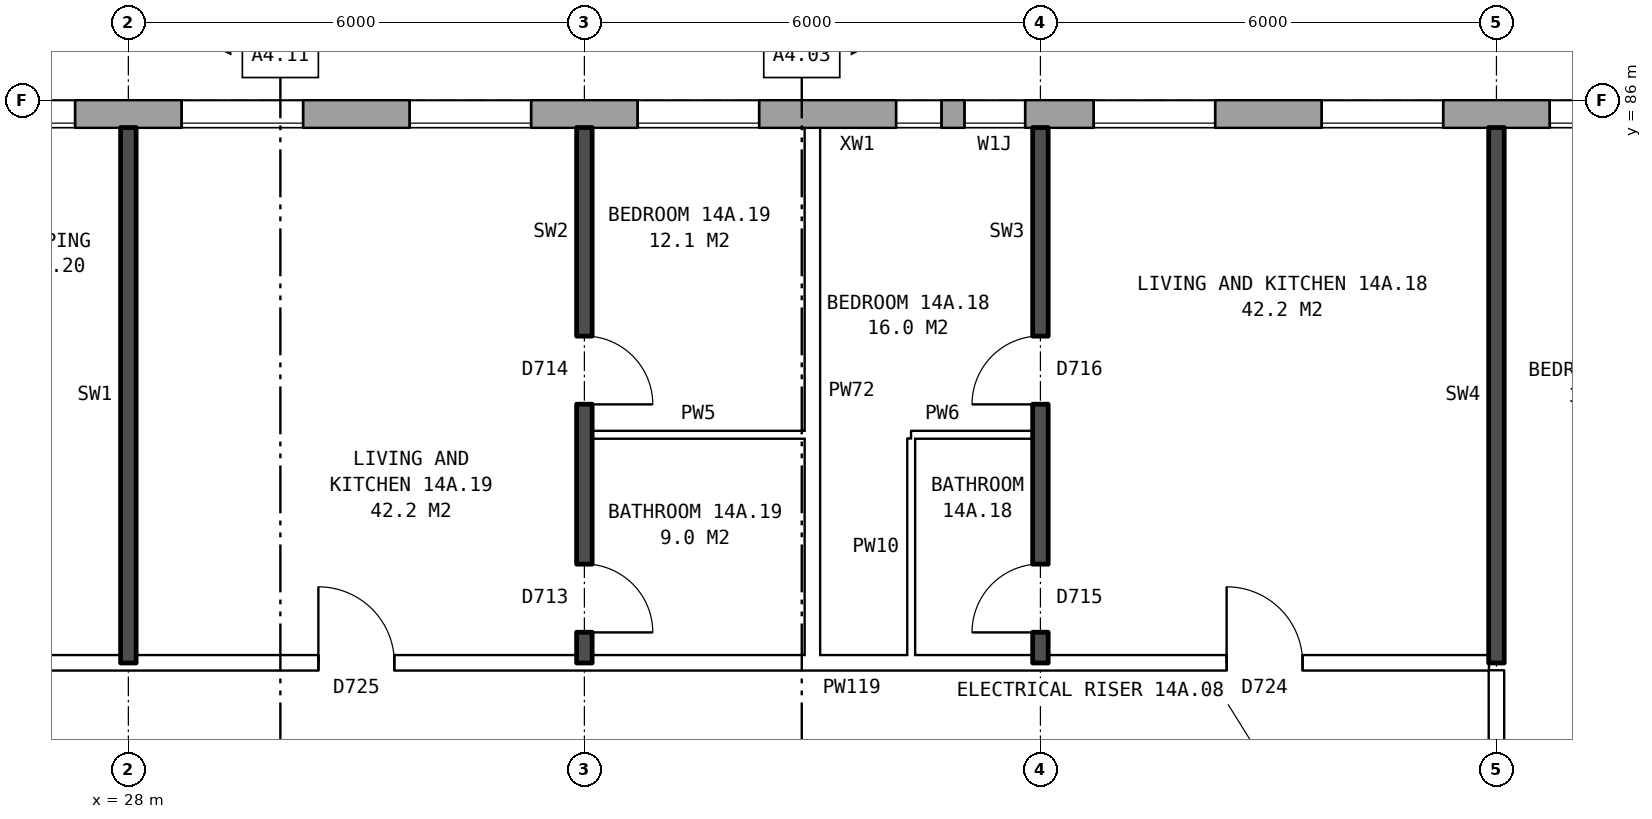
"""IFC4 building model, lengths in metres.
Left out: names, types, materials, properties, quantities, classifications, styles, units other than length and angle.
Written with IfcOpenShell. Run it as: python <this file> out.ifc"""

import sys

from ifc_helpers import new_model, si_unit, direction, frame, frame_2d, origin, place, context, subcontext, project, spatial, rectangle, extrude, element, fill, save


model = new_model("IFC4")
c1 = context("Model", 3, precision=1e-05, world=origin(), true_north=direction((0.0, 1.0)))
c2 = subcontext(c1, "Body", "Model", "MODEL_VIEW")
j1 = project(units=[si_unit("LENGTHUNIT", "METRE"), si_unit("PLANEANGLEUNIT", "RADIAN")], contexts=[c1])
p1 = place(None, origin())
s1 = spatial("IfcSite", under=j1, at=p1, CompositionType="ELEMENT")
p2 = place(p1, origin())
s2 = spatial("IfcBuilding", under=s1, at=p2, CompositionType="ELEMENT")
p3 = place(p2, frame((0.0, 0.0, 53.6)))
s3 = spatial("IfcBuildingStorey", under=s2, at=p3, CompositionType="ELEMENT", Elevation=53.6)
p4 = place(p3, frame((72.925, 85.82, 0.0), z_axis=(0.0, 0.0, 1.0), x_axis=(-1.0, 0.0, 0.0)))
e1 = element("IfcWall", 1, at=p4, inside=s3, PredefinedType="STANDARD", context=c2, shape_type="SweptSolid", body=[
    extrude(rectangle(XDim=48.351, YDim=0.36, at=frame_2d((24.175, 0.0))), origin(), (0.0, 0.0, 1.0), 2.85),
])
p5 = place(p4, frame((0.625, 0.0, 0.8)))
e2 = element("IfcOpeningElement", 2, at=p5, cuts=e1, PredefinedType="OPENING", context=c2, shape_type="SweptSolid", body=[
    extrude(rectangle(XDim=1.6, YDim=1.8, at=frame_2d((0.8, 0.9))), frame((0.0, 0.19, 0.0), z_axis=(0.0, -1.0, 0.0), x_axis=(1.0, 0.0, 0.0)), (0.0, 0.0, 1.0), 0.38),
])
p6 = place(p4, frame((3.625, 0.0, 0.8)))
e3 = element("IfcOpeningElement", 3, at=p6, cuts=e1, PredefinedType="OPENING", context=c2, shape_type="SweptSolid", body=[
    extrude(rectangle(XDim=1.6, YDim=1.8, at=frame_2d((0.8, 0.9))), frame((0.0, 0.19, 0.0), z_axis=(0.0, -1.0, 0.0), x_axis=(1.0, 0.0, 0.0)), (0.0, 0.0, 1.0), 0.38),
])
p7 = place(p4, frame((6.625, 0.0, 0.8)))
e4 = element("IfcOpeningElement", 4, at=p7, cuts=e1, PredefinedType="OPENING", context=c2, shape_type="SweptSolid", body=[
    extrude(rectangle(XDim=1.6, YDim=1.8, at=frame_2d((0.8, 0.9))), frame((0.0, 0.19, 0.0), z_axis=(0.0, -1.0, 0.0), x_axis=(1.0, 0.0, 0.0)), (0.0, 0.0, 1.0), 0.38),
])
p8 = place(p4, frame((9.625, 0.0, 0.8)))
e5 = element("IfcOpeningElement", 5, at=p8, cuts=e1, PredefinedType="OPENING", context=c2, shape_type="SweptSolid", body=[
    extrude(rectangle(XDim=1.6, YDim=1.8, at=frame_2d((0.8, 0.9))), frame((0.0, 0.19, 0.0), z_axis=(0.0, -1.0, 0.0), x_axis=(1.0, 0.0, 0.0)), (0.0, 0.0, 1.0), 0.38),
])
p9 = place(p4, frame((12.075, 0.0, 1.55)))
e6 = element("IfcOpeningElement", 6, at=p9, cuts=e1, PredefinedType="OPENING", context=c2, shape_type="SweptSolid", body=[
    extrude(rectangle(XDim=0.6, YDim=0.9, at=frame_2d((0.3, 0.45))), frame((0.0, 0.19, 0.0), z_axis=(0.0, -1.0, 0.0), x_axis=(1.0, 0.0, 0.0)), (0.0, 0.0, 1.0), 0.38),
])
p10 = place(p4, frame((15.625, 0.0, 0.8)))
e7 = element("IfcOpeningElement", 7, at=p10, cuts=e1, PredefinedType="OPENING", context=c2, shape_type="SweptSolid", body=[
    extrude(rectangle(XDim=1.6, YDim=1.8, at=frame_2d((0.8, 0.9))), frame((0.0, 0.19, 0.0), z_axis=(0.0, -1.0, 0.0), x_axis=(1.0, 0.0, 0.0)), (0.0, 0.0, 1.0), 0.38),
])
p11 = place(p4, frame((18.625, 0.0, 0.8)))
e8 = element("IfcOpeningElement", 8, at=p11, cuts=e1, PredefinedType="OPENING", context=c2, shape_type="SweptSolid", body=[
    extrude(rectangle(XDim=1.6, YDim=1.8, at=frame_2d((0.8, 0.9))), frame((0.0, 0.19, 0.0), z_axis=(0.0, -1.0, 0.0), x_axis=(1.0, 0.0, 0.0)), (0.0, 0.0, 1.0), 0.38),
])
p12 = place(p4, frame((21.625, 0.0, 0.8)))
e9 = element("IfcOpeningElement", 9, at=p12, cuts=e1, PredefinedType="OPENING", context=c2, shape_type="SweptSolid", body=[
    extrude(rectangle(XDim=1.6, YDim=1.8, at=frame_2d((0.8, 0.9))), frame((0.0, 0.19, 0.0), z_axis=(0.0, -1.0, 0.0), x_axis=(1.0, 0.0, 0.0)), (0.0, 0.0, 1.0), 0.38),
])
p13 = place(p4, frame((24.625, 0.0, 0.8)))
e10 = element("IfcOpeningElement", 10, at=p13, cuts=e1, PredefinedType="OPENING", context=c2, shape_type="SweptSolid", body=[
    extrude(rectangle(XDim=1.6, YDim=1.8, at=frame_2d((0.8, 0.9))), frame((0.0, 0.19, 0.0), z_axis=(0.0, -1.0, 0.0), x_axis=(1.0, 0.0, 0.0)), (0.0, 0.0, 1.0), 0.38),
])
p14 = place(p4, frame((27.625, 0.0, 0.8)))
e11 = element("IfcOpeningElement", 11, at=p14, cuts=e1, PredefinedType="OPENING", context=c2, shape_type="SweptSolid", body=[
    extrude(rectangle(XDim=1.6, YDim=1.8, at=frame_2d((0.8, 0.9))), frame((0.0, 0.19, 0.0), z_axis=(0.0, -1.0, 0.0), x_axis=(1.0, 0.0, 0.0)), (0.0, 0.0, 1.0), 0.38),
])
p15 = place(p4, frame((30.625, 0.0, 0.8)))
e12 = element("IfcOpeningElement", 12, at=p15, cuts=e1, PredefinedType="OPENING", context=c2, shape_type="SweptSolid", body=[
    extrude(rectangle(XDim=1.6, YDim=1.8, at=frame_2d((0.8, 0.9))), frame((0.0, 0.19, 0.0), z_axis=(0.0, -1.0, 0.0), x_axis=(1.0, 0.0, 0.0)), (0.0, 0.0, 1.0), 0.38),
])
p16 = place(p4, frame((33.125, 0.0, 0.25)))
e13 = element("IfcOpeningElement", 13, at=p16, cuts=e1, PredefinedType="OPENING", context=c2, shape_type="SweptSolid", body=[
    extrude(rectangle(XDim=0.8, YDim=1.5, at=frame_2d((0.4, 0.75))), frame((0.0, 0.19, 0.0), z_axis=(0.0, -1.0, 0.0), x_axis=(1.0, 0.0, 0.0)), (0.0, 0.0, 1.0), 0.38),
])
p17 = place(p4, frame((36.625, 0.0, 0.8)))
e14 = element("IfcOpeningElement", 14, at=p17, cuts=e1, PredefinedType="OPENING", context=c2, shape_type="SweptSolid", body=[
    extrude(rectangle(XDim=1.6, YDim=1.8, at=frame_2d((0.8, 0.9))), frame((0.0, 0.19, 0.0), z_axis=(0.0, -1.0, 0.0), x_axis=(1.0, 0.0, 0.0)), (0.0, 0.0, 1.0), 0.38),
])
p18 = place(p4, frame((39.625, 0.0, 0.8)))
e15 = element("IfcOpeningElement", 15, at=p18, cuts=e1, PredefinedType="OPENING", context=c2, shape_type="SweptSolid", body=[
    extrude(rectangle(XDim=1.6, YDim=1.8, at=frame_2d((0.8, 0.9))), frame((0.0, 0.19, 0.0), z_axis=(0.0, -1.0, 0.0), x_axis=(1.0, 0.0, 0.0)), (0.0, 0.0, 1.0), 0.38),
])
p19 = place(p4, frame((42.625, 0.0, 0.8)))
e16 = element("IfcOpeningElement", 16, at=p19, cuts=e1, PredefinedType="OPENING", context=c2, shape_type="SweptSolid", body=[
    extrude(rectangle(XDim=1.6, YDim=1.8, at=frame_2d((0.8, 0.9))), frame((0.0, 0.19, 0.0), z_axis=(0.0, -1.0, 0.0), x_axis=(1.0, 0.0, 0.0)), (0.0, 0.0, 1.0), 0.38),
])
p20 = place(p4, frame((45.625, 0.0, 0.8)))
e17 = element("IfcOpeningElement", 17, at=p20, cuts=e1, PredefinedType="OPENING", context=c2, shape_type="SweptSolid", body=[
    extrude(rectangle(XDim=1.6, YDim=1.8, at=frame_2d((0.8, 0.9))), frame((0.0, 0.19, 0.0), z_axis=(0.0, -1.0, 0.0), x_axis=(1.0, 0.0, 0.0)), (0.0, 0.0, 1.0), 0.38),
])
p21 = place(p4, frame((13.325, 0.0, 0.15)))
e18 = element("IfcOpeningElement", 18, at=p21, cuts=e1, PredefinedType="OPENING", context=c2, shape_type="SweptSolid", body=[
    extrude(rectangle(XDim=1.4, YDim=0.9, at=frame_2d((0.7, 0.45))), frame((0.0, 0.19, 0.0), z_axis=(0.0, -1.0, 0.0), x_axis=(1.0, 0.0, 0.0)), (0.0, 0.0, 1.0), 0.38),
])
p22 = place(p4, frame((34.225, 0.0, 0.25)))
e19 = element("IfcOpeningElement", 19, at=p22, cuts=e1, PredefinedType="OPENING", context=c2, shape_type="SweptSolid", body=[
    extrude(rectangle(XDim=0.6, YDim=0.9, at=frame_2d((0.3, 0.45))), frame((0.0, 0.19, 0.0), z_axis=(0.0, -1.0, 0.0), x_axis=(1.0, 0.0, 0.0)), (0.0, 0.0, 1.0), 0.38),
])
p23 = place(p3, frame((21.86, 78.6, 0.0), z_axis=(0.0, 0.0, 1.0), x_axis=(1.0, 0.0, 0.0)))
e20 = element("IfcWall", 20, at=p23, inside=s3, PredefinedType="PARTITIONING", context=c2, shape_type="SweptSolid", body=[
    extrude(rectangle(XDim=24.04, YDim=0.2, at=frame_2d((12.02, 0.0))), origin(), (0.0, 0.0, 1.0), 2.85),
])
p24 = place(p23, frame((20.59, 0.0, 0.0)))
e21 = element("IfcOpeningElement", 21, at=p24, cuts=e20, PredefinedType="OPENING", context=c2, shape_type="SweptSolid", body=[
    extrude(rectangle(XDim=1.0, YDim=2.1, at=frame_2d((0.5, 1.05))), frame((0.0, 0.11, 0.0), z_axis=(0.0, -1.0, 0.0), x_axis=(1.0, 0.0, 0.0)), (0.0, 0.0, 1.0), 0.22),
])
p25 = place(p23, frame((8.64, 0.0, 0.0)))
e22 = element("IfcOpeningElement", 22, at=p25, cuts=e20, PredefinedType="OPENING", context=c2, shape_type="SweptSolid", body=[
    extrude(rectangle(XDim=1.0, YDim=2.1, at=frame_2d((0.5, 1.05))), frame((0.0, 0.11, 0.0), z_axis=(0.0, -1.0, 0.0), x_axis=(1.0, 0.0, 0.0)), (0.0, 0.0, 1.0), 0.22),
])
p26 = place(p23, frame((3.64, 0.0, 0.0)))
e23 = element("IfcOpeningElement", 23, at=p26, cuts=e20, PredefinedType="OPENING", context=c2, shape_type="SweptSolid", body=[
    extrude(rectangle(XDim=1.0, YDim=2.1, at=frame_2d((0.5, 1.05))), frame((0.0, 0.11, 0.0), z_axis=(0.0, -1.0, 0.0), x_axis=(1.0, 0.0, 0.0)), (0.0, 0.0, 1.0), 0.22),
])
p27 = place(p3, frame((34.1, 81.6, 0.0), z_axis=(0.0, 0.0, 1.0), x_axis=(1.0, 0.0, 0.0)))
e24 = element("IfcWall", 24, at=p27, inside=s3, PredefinedType="PARTITIONING", context=c2, shape_type="SweptSolid", body=[
    extrude(rectangle(XDim=2.8, YDim=0.1, at=frame_2d((1.4, 0.0))), origin(), (0.0, 0.0, 1.0), 2.85),
])
p28 = place(p3, frame((38.3, 81.6, 0.0), z_axis=(0.0, 0.0, 1.0), x_axis=(1.0, 0.0, 0.0)))
e25 = element("IfcWall", 25, at=p28, inside=s3, PredefinedType="PARTITIONING", context=c2, shape_type="SweptSolid", body=[
    extrude(rectangle(XDim=1.6, YDim=0.1, at=frame_2d((0.8, 0.0))), origin(), (0.0, 0.0, 1.0), 2.85),
])
p29 = place(p3, frame((28.0, 78.6, 0.0), z_axis=(0.0, 0.0, 1.0), x_axis=(0.0, 1.0, 0.0)))
e26 = element("IfcWall", 26, at=p29, inside=s3, PredefinedType="SOLIDWALL", context=c2, shape_type="SweptSolid", body=[
    extrude(rectangle(XDim=7.04, YDim=0.2, at=frame_2d((3.52, 0.0))), origin(), (0.0, 0.0, 1.0), 2.85),
])
p30 = place(p3, frame((34.0, 78.6, 0.0), z_axis=(0.0, 0.0, 1.0), x_axis=(0.0, 1.0, 0.0)))
e27 = element("IfcWall", 27, at=p30, inside=s3, PredefinedType="SOLIDWALL", context=c2, shape_type="SweptSolid", body=[
    extrude(rectangle(XDim=7.04, YDim=0.2, at=frame_2d((3.52, 0.0))), origin(), (0.0, 0.0, 1.0), 2.85),
])
p31 = place(p30, frame((3.4, 0.0, 0.0)))
e28 = element("IfcOpeningElement", 28, at=p31, cuts=e27, PredefinedType="OPENING", context=c2, shape_type="SweptSolid", body=[
    extrude(rectangle(XDim=0.9, YDim=2.1, at=frame_2d((0.45, 1.05))), frame((0.0, 0.11, 0.0), z_axis=(0.0, -1.0, 0.0), x_axis=(1.0, 0.0, 0.0)), (0.0, 0.0, 1.0), 0.22),
])
p32 = place(p30, frame((0.4, 0.0, 0.0)))
e29 = element("IfcOpeningElement", 29, at=p32, cuts=e27, PredefinedType="OPENING", context=c2, shape_type="SweptSolid", body=[
    extrude(rectangle(XDim=0.9, YDim=2.1, at=frame_2d((0.45, 1.05))), frame((0.0, 0.11, 0.0), z_axis=(0.0, -1.0, 0.0), x_axis=(1.0, 0.0, 0.0)), (0.0, 0.0, 1.0), 0.22),
])
p33 = place(p3, frame((37.0, 78.7, 0.0), z_axis=(0.0, 0.0, 1.0), x_axis=(0.0, 1.0, 0.0)))
e30 = element("IfcWall", 30, at=p33, inside=s3, PredefinedType="PARTITIONING", context=c2, shape_type="SweptSolid", body=[
    extrude(rectangle(XDim=6.94, YDim=0.2, at=frame_2d((3.47, 0.0))), origin(), (0.0, 0.0, 1.0), 2.85),
])
p34 = place(p3, frame((38.3, 78.7, 0.0), z_axis=(0.0, 0.0, 1.0), x_axis=(0.0, 1.0, 0.0)))
e31 = element("IfcWall", 31, at=p34, inside=s3, PredefinedType="PARTITIONING", context=c2, shape_type="SweptSolid", body=[
    extrude(rectangle(XDim=2.85, YDim=0.1, at=frame_2d((1.425, 0.0))), origin(), (0.0, 0.0, 1.0), 2.85),
])
p35 = place(p3, frame((40.0, 78.6, 0.0), z_axis=(0.0, 0.0, 1.0), x_axis=(0.0, 1.0, 0.0)))
e32 = element("IfcWall", 32, at=p35, inside=s3, PredefinedType="SOLIDWALL", context=c2, shape_type="SweptSolid", body=[
    extrude(rectangle(XDim=7.04, YDim=0.2, at=frame_2d((3.52, 0.0))), origin(), (0.0, 0.0, 1.0), 2.85),
])
p36 = place(p35, frame((3.4, 0.0, 0.0)))
e33 = element("IfcOpeningElement", 33, at=p36, cuts=e32, PredefinedType="OPENING", context=c2, shape_type="SweptSolid", body=[
    extrude(rectangle(XDim=0.9, YDim=2.1, at=frame_2d((0.45, 1.05))), frame((0.0, 0.11, 0.0), z_axis=(0.0, -1.0, 0.0), x_axis=(1.0, 0.0, 0.0)), (0.0, 0.0, 1.0), 0.22),
])
p37 = place(p35, frame((0.4, 0.0, 0.0)))
e34 = element("IfcOpeningElement", 34, at=p37, cuts=e32, PredefinedType="OPENING", context=c2, shape_type="SweptSolid", body=[
    extrude(rectangle(XDim=0.9, YDim=2.1, at=frame_2d((0.45, 1.05))), frame((0.0, 0.11, 0.0), z_axis=(0.0, -1.0, 0.0), x_axis=(1.0, 0.0, 0.0)), (0.0, 0.0, 1.0), 0.22),
])
p38 = place(p3, frame((46.0, 76.3, 0.0), z_axis=(0.0, 0.0, 1.0), x_axis=(0.0, 1.0, 0.0)))
e35 = element("IfcWall", 35, at=p38, inside=s3, PredefinedType="PARTITIONING", context=c2, shape_type="SweptSolid", body=[
    extrude(rectangle(XDim=2.2, YDim=0.2, at=frame_2d((1.1, 0.0))), origin(), (0.0, 0.0, 1.0), 2.85),
])
p39 = place(p3, frame((46.0, 78.6, 0.0), z_axis=(0.0, 0.0, 1.0), x_axis=(0.0, 1.0, 0.0)))
e36 = element("IfcWall", 36, at=p39, inside=s3, PredefinedType="SOLIDWALL", context=c2, shape_type="SweptSolid", body=[
    extrude(rectangle(XDim=7.04, YDim=0.2, at=frame_2d((3.52, 0.0))), origin(), (0.0, 0.0, 1.0), 2.85),
])
p40 = place(p13, origin())
e37 = element("IfcWindow", 37, at=p40, inside=s3, PartitioningType="SINGLE_PANEL", PredefinedType="WINDOW", context=c2, shape_type="SweptSolid", body=[
    extrude(rectangle(XDim=1.6, YDim=1.8, at=frame_2d((0.8, 0.9))), frame((0.0, 0.15, 0.0), z_axis=(0.0, -1.0, 0.0), x_axis=(1.0, 0.0, 0.0)), (0.0, 0.0, 1.0), 0.06),
])
fill(e10, e37)
p41 = place(p14, origin())
e38 = element("IfcWindow", 38, at=p41, inside=s3, PartitioningType="SINGLE_PANEL", PredefinedType="WINDOW", context=c2, shape_type="SweptSolid", body=[
    extrude(rectangle(XDim=1.6, YDim=1.8, at=frame_2d((0.8, 0.9))), frame((0.0, 0.15, 0.0), z_axis=(0.0, -1.0, 0.0), x_axis=(1.0, 0.0, 0.0)), (0.0, 0.0, 1.0), 0.06),
])
fill(e11, e38)
p42 = place(p15, origin())
e39 = element("IfcWindow", 39, at=p42, inside=s3, PartitioningType="SINGLE_PANEL", PredefinedType="WINDOW", context=c2, shape_type="SweptSolid", body=[
    extrude(rectangle(XDim=1.6, YDim=1.8, at=frame_2d((0.8, 0.9))), frame((0.0, 0.15, 0.0), z_axis=(0.0, -1.0, 0.0), x_axis=(1.0, 0.0, 0.0)), (0.0, 0.0, 1.0), 0.06),
])
fill(e12, e39)
p43 = place(p16, origin())
e40 = element("IfcWindow", 40, at=p43, inside=s3, PartitioningType="SINGLE_PANEL", PredefinedType="WINDOW", context=c2, shape_type="SweptSolid", body=[
    extrude(rectangle(XDim=0.8, YDim=1.5, at=frame_2d((0.4, 0.75))), frame((0.0, 0.15, 0.0), z_axis=(0.0, -1.0, 0.0), x_axis=(1.0, 0.0, 0.0)), (0.0, 0.0, 1.0), 0.06),
])
fill(e13, e40)
p44 = place(p17, origin())
e41 = element("IfcWindow", 41, at=p44, inside=s3, PartitioningType="SINGLE_PANEL", PredefinedType="WINDOW", context=c2, shape_type="SweptSolid", body=[
    extrude(rectangle(XDim=1.6, YDim=1.8, at=frame_2d((0.8, 0.9))), frame((0.0, 0.15, 0.0), z_axis=(0.0, -1.0, 0.0), x_axis=(1.0, 0.0, 0.0)), (0.0, 0.0, 1.0), 0.06),
])
fill(e14, e41)
p45 = place(p18, origin())
e42 = element("IfcWindow", 42, at=p45, inside=s3, PartitioningType="SINGLE_PANEL", PredefinedType="WINDOW", context=c2, shape_type="SweptSolid", body=[
    extrude(rectangle(XDim=1.6, YDim=1.8, at=frame_2d((0.8, 0.9))), frame((0.0, 0.15, 0.0), z_axis=(0.0, -1.0, 0.0), x_axis=(1.0, 0.0, 0.0)), (0.0, 0.0, 1.0), 0.06),
])
fill(e15, e42)
p46 = place(p19, origin())
e43 = element("IfcWindow", 43, at=p46, inside=s3, PartitioningType="SINGLE_PANEL", PredefinedType="WINDOW", context=c2, shape_type="SweptSolid", body=[
    extrude(rectangle(XDim=1.6, YDim=1.8, at=frame_2d((0.8, 0.9))), frame((0.0, 0.15, 0.0), z_axis=(0.0, -1.0, 0.0), x_axis=(1.0, 0.0, 0.0)), (0.0, 0.0, 1.0), 0.06),
])
fill(e16, e43)
p47 = place(p20, origin())
e44 = element("IfcWindow", 44, at=p47, inside=s3, PartitioningType="SINGLE_PANEL", PredefinedType="WINDOW", context=c2, shape_type="SweptSolid", body=[
    extrude(rectangle(XDim=1.6, YDim=1.8, at=frame_2d((0.8, 0.9))), frame((0.0, 0.15, 0.0), z_axis=(0.0, -1.0, 0.0), x_axis=(1.0, 0.0, 0.0)), (0.0, 0.0, 1.0), 0.06),
])
fill(e17, e44)
p48 = place(p36, origin())
e45 = element("IfcDoor", 45, at=p48, inside=s3, OperationType="SINGLE_SWING_LEFT", PredefinedType="DOOR", context=c2, shape_type="SweptSolid", body=[
    extrude(rectangle(XDim=0.9, YDim=2.1, at=frame_2d((0.45, 1.05))), frame((0.0, 0.025, 0.0), z_axis=(0.0, -1.0, 0.0), x_axis=(1.0, 0.0, 0.0)), (0.0, 0.0, 1.0), 0.05),
])
fill(e33, e45)
p49 = place(p24, origin())
e46 = element("IfcDoor", 46, at=p49, inside=s3, OperationType="SINGLE_SWING_LEFT", PredefinedType="DOOR", context=c2, shape_type="SweptSolid", body=[
    extrude(rectangle(XDim=1.0, YDim=2.1, at=frame_2d((0.5, 1.05))), frame((0.0, 0.025, 0.0), z_axis=(0.0, -1.0, 0.0), x_axis=(1.0, 0.0, 0.0)), (0.0, 0.0, 1.0), 0.05),
])
fill(e21, e46)
p50 = place(p37, origin())
e47 = element("IfcDoor", 47, at=p50, inside=s3, OperationType="SINGLE_SWING_LEFT", PredefinedType="DOOR", context=c2, shape_type="SweptSolid", body=[
    extrude(rectangle(XDim=0.9, YDim=2.1, at=frame_2d((0.45, 1.05))), frame((0.0, 0.025, 0.0), z_axis=(0.0, -1.0, 0.0), x_axis=(1.0, 0.0, 0.0)), (0.0, 0.0, 1.0), 0.05),
])
fill(e34, e47)
p51 = place(p31, frame((0.9, 0.0, 0.0), z_axis=(0.0, 0.0, 1.0), x_axis=(-1.0, 0.0, 0.0)))
e48 = element("IfcDoor", 48, at=p51, inside=s3, OperationType="SINGLE_SWING_RIGHT", PredefinedType="DOOR", context=c2, shape_type="SweptSolid", body=[
    extrude(rectangle(XDim=0.9, YDim=2.1, at=frame_2d((0.45, 1.05))), frame((0.0, 0.025, 0.0), z_axis=(0.0, -1.0, 0.0), x_axis=(1.0, 0.0, 0.0)), (0.0, 0.0, 1.0), 0.05),
])
fill(e28, e48)
p52 = place(p25, origin())
e49 = element("IfcDoor", 49, at=p52, inside=s3, OperationType="SINGLE_SWING_LEFT", PredefinedType="DOOR", context=c2, shape_type="SweptSolid", body=[
    extrude(rectangle(XDim=1.0, YDim=2.1, at=frame_2d((0.5, 1.05))), frame((0.0, 0.025, 0.0), z_axis=(0.0, -1.0, 0.0), x_axis=(1.0, 0.0, 0.0)), (0.0, 0.0, 1.0), 0.05),
])
fill(e22, e49)
p53 = place(p32, frame((0.9, 0.0, 0.0), z_axis=(0.0, 0.0, 1.0), x_axis=(-1.0, 0.0, 0.0)))
e50 = element("IfcDoor", 50, at=p53, inside=s3, OperationType="SINGLE_SWING_RIGHT", PredefinedType="DOOR", context=c2, shape_type="SweptSolid", body=[
    extrude(rectangle(XDim=0.9, YDim=2.1, at=frame_2d((0.45, 1.05))), frame((0.0, 0.025, 0.0), z_axis=(0.0, -1.0, 0.0), x_axis=(1.0, 0.0, 0.0)), (0.0, 0.0, 1.0), 0.05),
])
fill(e29, e50)
p54 = place(p22, origin())
e51 = element("IfcWindow", 51, at=p54, inside=s3, PartitioningType="SINGLE_PANEL", PredefinedType="WINDOW", context=c2, shape_type="SweptSolid", body=[
    extrude(rectangle(XDim=0.6, YDim=0.9, at=frame_2d((0.3, 0.45))), frame((0.0, 0.15, 0.0), z_axis=(0.0, -1.0, 0.0), x_axis=(1.0, 0.0, 0.0)), (0.0, 0.0, 1.0), 0.06),
])
fill(e19, e51)
save(model, sys.argv[1])
